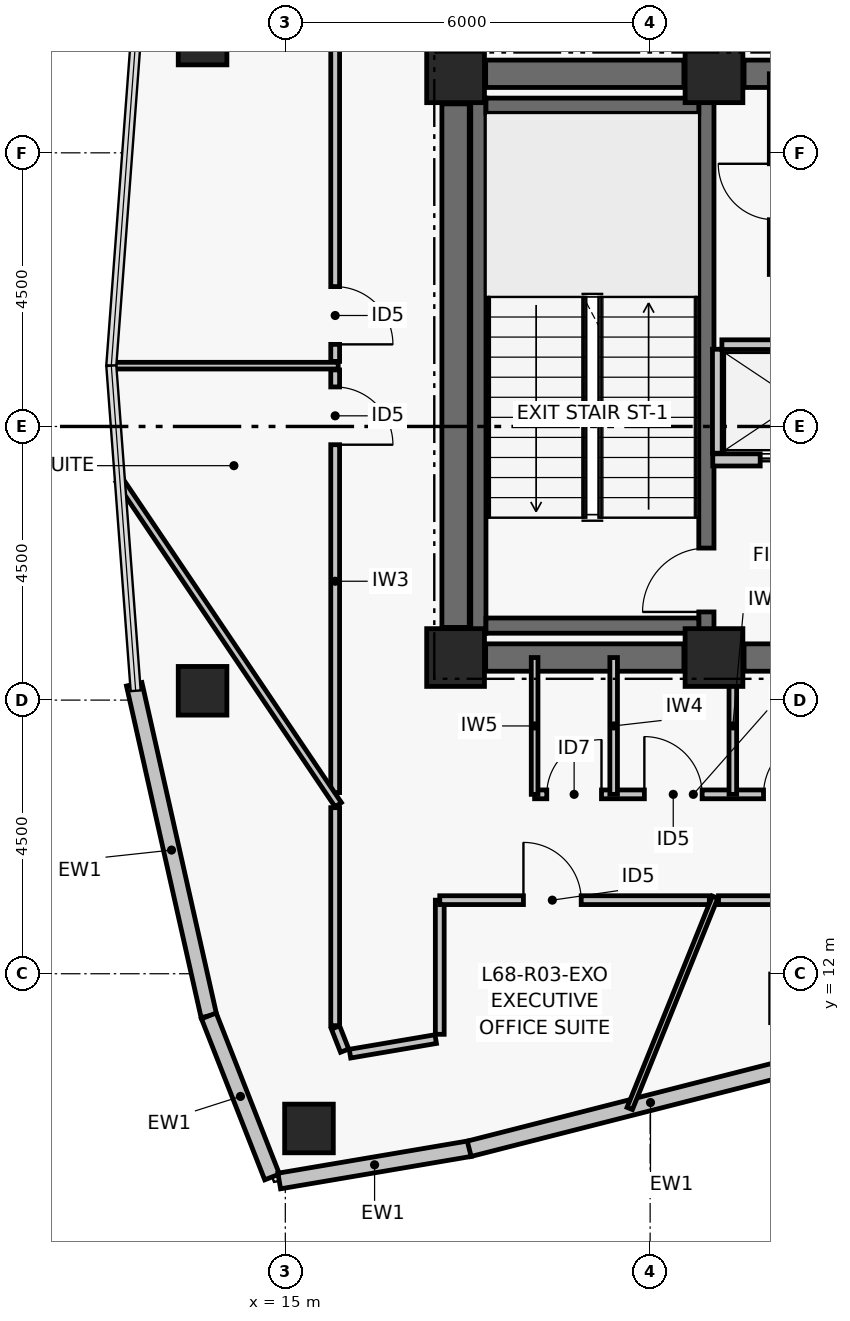
"""IFC4 building model, lengths in metres.
Left out: names, types, materials, properties, quantities, classifications, styles, units other than length and angle.
Written with IfcOpenShell. Run it as: python <this file> out.ifc"""

import sys

from ifc_helpers import new_model, si_unit, direction, frame, frame_2d, origin, origin_2d, place, context, subcontext, project, spatial, rectangle, hollow_rectangle, extrude, element, fill, save


model = new_model("IFC4")
c1 = context("Model", 3, precision=1e-05, world=origin(), true_north=direction((0.0, 1.0)))
c2 = subcontext(c1, "Body", "Model", "MODEL_VIEW")
j1 = project(units=[si_unit("LENGTHUNIT", "METRE"), si_unit("PLANEANGLEUNIT", "RADIAN")], contexts=[c1])
p1 = place(None, origin())
s1 = spatial("IfcSite", under=j1, at=p1, CompositionType="ELEMENT")
p2 = place(p1, origin())
s2 = spatial("IfcBuilding", under=s1, at=p2, CompositionType="ELEMENT")
p3 = place(p2, frame((0.0, 0.0, 269.46)))
s3 = spatial("IfcBuildingStorey", under=s2, at=p3, CompositionType="ELEMENT", Elevation=269.46)
for number, where, z_axis, x_axis in (
    (1, (17.8, 17.2, 0.0), (0.0, 0.0, 1.0), (1.0, 0.0, 0.0)),
    (2, (22.05, 17.2, 0.0), (0.0, 0.0, 1.0), (1.0, 0.0, 0.0)),
    (3, (17.8, 26.8, 0.0), (0.0, 0.0, 1.0), (1.0, 0.0, 0.0)),
    (4, (22.05, 26.8, 0.0), (0.0, 0.0, 1.0), (1.0, 0.0, 0.0)),
):
    element("IfcColumn", number, at=place(p3, frame(where, z_axis=z_axis, x_axis=x_axis)), inside=s3, PredefinedType="COLUMN", context=c2, shape_type="SweptSolid", body=[
        extrude(rectangle(XDim=0.95, YDim=0.95, at=origin_2d()), origin(), (0.0, 0.0, 1.0), 3.72),
    ])
p4 = place(p3, frame((18.295, 17.2, 0.0), z_axis=(0.0, 0.0, 1.0), x_axis=(1.0, 0.0, 0.0)))
e5 = element("IfcWall", 5, at=p4, inside=s3, PredefinedType="SHEAR", context=c2, shape_type="SweptSolid", body=[
    extrude(rectangle(XDim=3.26, YDim=0.45, at=frame_2d((1.63, 0.0))), origin(), (0.0, 0.0, 1.0), 3.5),
])
p5 = place(p3, frame((22.545, 17.2, 0.0), z_axis=(0.0, 0.0, 1.0), x_axis=(1.0, 0.0, 0.0)))
e6 = element("IfcWall", 6, at=p5, inside=s3, PredefinedType="SHEAR", context=c2, shape_type="SweptSolid", body=[
    extrude(rectangle(XDim=1.805, YDim=0.45, at=frame_2d((0.903, 0.0))), origin(), (0.0, 0.0, 1.0), 3.5),
])
p6 = place(p3, frame((18.295, 26.8, 0.0), z_axis=(0.0, 0.0, 1.0), x_axis=(1.0, 0.0, 0.0)))
e7 = element("IfcWall", 7, at=p6, inside=s3, PredefinedType="SHEAR", context=c2, shape_type="SweptSolid", body=[
    extrude(rectangle(XDim=3.26, YDim=0.45, at=frame_2d((1.63, 0.0))), origin(), (0.0, 0.0, 1.0), 3.5),
])
p7 = place(p3, frame((22.545, 26.8, 0.0), z_axis=(0.0, 0.0, 1.0), x_axis=(1.0, 0.0, 0.0)))
e8 = element("IfcWall", 8, at=p7, inside=s3, PredefinedType="SHEAR", context=c2, shape_type="SweptSolid", body=[
    extrude(rectangle(XDim=1.805, YDim=0.45, at=frame_2d((0.903, 0.0))), origin(), (0.0, 0.0, 1.0), 3.5),
])
p8 = place(p3, frame((17.8, 17.695, 0.0), z_axis=(0.0, 0.0, 1.0), x_axis=(0.0, 1.0, 0.0)))
e9 = element("IfcWall", 9, at=p8, inside=s3, PredefinedType="SHEAR", context=c2, shape_type="SweptSolid", body=[
    extrude(rectangle(XDim=8.61, YDim=0.45, at=frame_2d((4.305, 0.0))), origin(), (0.0, 0.0, 1.0), 3.5),
])
p9 = place(p3, frame((18.175, 17.6, 0.0), z_axis=(0.0, 0.0, 1.0), x_axis=(0.0, 1.0, 0.0)))
e10 = element("IfcWall", 10, at=p9, inside=s3, PredefinedType="SHEAR", context=c2, shape_type="SweptSolid", body=[
    extrude(rectangle(XDim=8.8, YDim=0.25, at=frame_2d((4.4, 0.0))), origin(), (0.0, 0.0, 1.0), 3.5),
])
p10 = place(p3, frame((21.925, 17.6, 0.0), z_axis=(0.0, 0.0, 1.0), x_axis=(0.0, 1.0, 0.0)))
e11 = element("IfcWall", 11, at=p10, inside=s3, PredefinedType="SHEAR", context=c2, shape_type="SweptSolid", body=[
    extrude(rectangle(XDim=8.8, YDim=0.25, at=frame_2d((4.4, 0.0))), origin(), (0.0, 0.0, 1.0), 3.5),
])
p11 = place(p10, frame((0.35, 0.0, 0.0)))
e12 = element("IfcOpeningElement", 12, at=p11, cuts=e11, PredefinedType="OPENING", context=c2, shape_type="SweptSolid", body=[
    extrude(rectangle(XDim=1.05, YDim=2.08, at=frame_2d((0.525, 1.04))), frame((0.0, 0.135, 0.0), z_axis=(0.0, -1.0, 0.0), x_axis=(1.0, 0.0, 0.0)), (0.0, 0.0, 1.0), 0.27),
])
for number, where, z_axis, x_axis in (
    (13, (18.3, 17.725, 0.0), (0.0, 0.0, 1.0), (1.0, 0.0, 0.0)),
    (14, (18.3, 26.275, 0.0), (0.0, 0.0, 1.0), (1.0, 0.0, 0.0)),
):
    element("IfcWall", number, at=place(p3, frame(where, z_axis=z_axis, x_axis=x_axis)), inside=s3, PredefinedType="SHEAR", context=c2, shape_type="SweptSolid", body=[
        extrude(rectangle(XDim=3.5, YDim=0.25, at=frame_2d((1.75, 0.0))), origin(), (0.0, 0.0, 1.0), 3.5),
    ])
for number, where, z_axis, x_axis in (
    (15, (13.639, 27.347, 0.0), (0.0, 0.0, 1.0), (1.0, 0.0, 0.0)),
    (16, (13.639, 16.653, 0.0), (0.0, 0.0, 1.0), (1.0, 0.0, 0.0)),
    (17, (15.389, 9.455, 0.0), (0.0, 0.0, 1.0), (1.0, 0.0, 0.0)),
):
    element("IfcColumn", number, at=place(p3, frame(where, z_axis=z_axis, x_axis=x_axis)), inside=s3, PredefinedType="COLUMN", context=c2, shape_type="SweptSolid", body=[
        extrude(hollow_rectangle(XDim=0.8, YDim=0.8, WallThickness=0.035, at=origin_2d()), origin(), (0.0, 0.0, 1.0), 3.72),
    ])
p12 = place(p3, frame((13.742, 11.307, 0.0), z_axis=(0.0, 0.0, 1.0), x_axis=(-0.219500763731, 0.97561232809, 0.0)))
e18 = element("IfcWall", 18, at=p12, inside=s3, PredefinedType="PARTITIONING", context=c2, shape_type="SweptSolid", body=[
    extrude(rectangle(XDim=5.59, YDim=0.26, at=frame_2d((2.795, 0.0))), origin(), (0.0, 0.0, 1.0), 3.5),
])
p13 = place(p3, frame((14.782, 8.658, 0.0), z_axis=(0.0, 0.0, 1.0), x_axis=(-0.36559927932, 0.930772349697, 0.0)))
e19 = element("IfcWall", 19, at=p13, inside=s3, PredefinedType="PARTITIONING", context=c2, shape_type="SweptSolid", body=[
    extrude(rectangle(XDim=2.845, YDim=0.26, at=frame_2d((1.423, 0.0))), origin(), (0.0, 0.0, 1.0), 3.5),
])
p14 = place(p3, frame((18.036, 9.124, 0.0), z_axis=(0.0, 0.0, 1.0), x_axis=(-0.985889432766, -0.167397808709, 0.0)))
e20 = element("IfcWall", 20, at=p14, inside=s3, PredefinedType="PARTITIONING", context=c2, shape_type="SweptSolid", body=[
    extrude(rectangle(XDim=3.181, YDim=0.26, at=frame_2d((1.59, 0.0))), origin(), (0.0, 0.0, 1.0), 3.5),
])
p15 = place(p3, frame((23.988, 10.642, 0.0), z_axis=(0.0, 0.0, 1.0), x_axis=(-0.968988278672, -0.247106689096, 0.0)))
e21 = element("IfcWall", 21, at=p15, inside=s3, PredefinedType="PARTITIONING", context=c2, shape_type="SweptSolid", body=[
    extrude(rectangle(XDim=6.154, YDim=0.26, at=frame_2d((3.077, 0.0))), origin(), (0.0, 0.0, 1.0), 3.5),
])
p16 = place(p3, frame((22.03, 20.45, 0.0), z_axis=(0.0, 0.0, 1.0), x_axis=(1.0, 0.0, 0.0)))
e22 = element("IfcWall", 22, at=p16, inside=s3, PredefinedType="PARTITIONING", context=c2, shape_type="SweptSolid", body=[
    extrude(rectangle(XDim=2.8, YDim=0.2, at=frame_2d((1.4, 0.0))), origin(), (0.0, 0.0, 1.0), 3.5),
])
p17 = place(p16, frame((0.78, 0.0, 0.0)))
e23 = element("IfcOpeningElement", 23, at=p17, cuts=e22, PredefinedType="OPENING", context=c2, shape_type="SweptSolid", body=[
    extrude(rectangle(XDim=1.1, YDim=2.08, at=frame_2d((0.55, 1.04))), frame((0.0, 0.11, 0.0), z_axis=(0.0, -1.0, 0.0), x_axis=(1.0, 0.0, 0.0)), (0.0, 0.0, 1.0), 0.22),
])
p18 = place(p3, frame((22.105, 20.56, 0.0), z_axis=(0.0, 0.0, 1.0), x_axis=(0.0, 1.0, 0.0)))
e24 = element("IfcWall", 24, at=p18, inside=s3, PredefinedType="PARTITIONING", context=c2, shape_type="SweptSolid", body=[
    extrude(rectangle(XDim=1.71, YDim=0.16, at=frame_2d((0.855, 0.0))), origin(), (0.0, 0.0, 1.0), 3.5),
])
p19 = place(p3, frame((22.18, 22.345, 0.0), z_axis=(0.0, 0.0, 1.0), x_axis=(1.0, 0.0, 0.0)))
e25 = element("IfcWall", 25, at=p19, inside=s3, PredefinedType="PARTITIONING", context=c2, shape_type="SweptSolid", body=[
    extrude(rectangle(XDim=2.65, YDim=0.16, at=frame_2d((1.325, 0.0))), origin(), (0.0, 0.0, 1.0), 3.5),
])
p20 = place(p3, frame((23.04, 23.5, 0.0), z_axis=(0.0, 0.0, 1.0), x_axis=(0.0, 1.0, 0.0)))
e26 = element("IfcWall", 26, at=p20, inside=s3, PredefinedType="PARTITIONING", context=c2, shape_type="SweptSolid", body=[
    extrude(rectangle(XDim=3.3, YDim=0.16, at=frame_2d((1.65, 0.0))), origin(), (0.0, 0.0, 1.0), 2.63),
])
p21 = place(p20, frame((0.9, 0.0, 0.0)))
e27 = element("IfcOpeningElement", 27, at=p21, cuts=e26, PredefinedType="OPENING", context=c2, shape_type="SweptSolid", body=[
    extrude(rectangle(XDim=0.92, YDim=2.05, at=frame_2d((0.46, 1.025))), frame((0.0, 0.09, 0.0), z_axis=(0.0, -1.0, 0.0), x_axis=(1.0, 0.0, 0.0)), (0.0, 0.0, 1.0), 0.18),
])
p22 = place(p3, frame((19.1, 14.95, 0.0), z_axis=(0.0, 0.0, 1.0), x_axis=(1.0, 0.0, 0.0)))
e28 = element("IfcWall", 28, at=p22, inside=s3, PredefinedType="PARTITIONING", context=c2, shape_type="SweptSolid", body=[
    extrude(rectangle(XDim=5.22, YDim=0.145, at=frame_2d((2.61, 0.0))), origin(), (0.0, 0.0, 1.0), 2.78),
])
p23 = place(p22, frame((0.2, 0.0, 0.0)))
e29 = element("IfcOpeningElement", 29, at=p23, cuts=e28, PredefinedType="OPENING", context=c2, shape_type="SweptSolid", body=[
    extrude(rectangle(XDim=0.9, YDim=2.02, at=frame_2d((0.45, 1.01))), frame((0.0, 0.083, 0.0), z_axis=(0.0, -1.0, 0.0), x_axis=(1.0, 0.0, 0.0)), (0.0, 0.0, 1.0), 0.165),
])
p24 = place(p22, frame((1.805, 0.0, 0.0)))
e30 = element("IfcOpeningElement", 30, at=p24, cuts=e28, PredefinedType="OPENING", context=c2, shape_type="SweptSolid", body=[
    extrude(rectangle(XDim=0.95, YDim=2.06, at=frame_2d((0.475, 1.03))), frame((0.0, 0.083, 0.0), z_axis=(0.0, -1.0, 0.0), x_axis=(1.0, 0.0, 0.0)), (0.0, 0.0, 1.0), 0.165),
])
p25 = place(p22, frame((3.765, 0.0, 0.0)))
e31 = element("IfcOpeningElement", 31, at=p25, cuts=e28, PredefinedType="OPENING", context=c2, shape_type="SweptSolid", body=[
    extrude(rectangle(XDim=0.95, YDim=2.06, at=frame_2d((0.475, 1.03))), frame((0.0, 0.083, 0.0), z_axis=(0.0, -1.0, 0.0), x_axis=(1.0, 0.0, 0.0)), (0.0, 0.0, 1.0), 0.165),
])
p26 = place(p3, frame((19.1, 14.95, 0.0), z_axis=(0.0, 0.0, 1.0), x_axis=(0.0, 1.0, 0.0)))
e32 = element("IfcWall", 32, at=p26, inside=s3, PredefinedType="PARTITIONING", context=c2, shape_type="SweptSolid", body=[
    extrude(rectangle(XDim=2.25, YDim=0.11, at=frame_2d((1.125, 0.0))), origin(), (0.0, 0.0, 1.0), 2.63),
])
for number, where, z_axis, x_axis in (
    (33, (20.4, 14.95, 0.0), (0.0, 0.0, 1.0), (0.0, 1.0, 0.0)),
    (34, (22.36, 14.95, 0.0), (0.0, 0.0, 1.0), (0.0, 1.0, 0.0)),
):
    element("IfcWall", number, at=place(p3, frame(where, z_axis=z_axis, x_axis=x_axis)), inside=s3, PredefinedType="PARTITIONING", context=c2, shape_type="SweptSolid", body=[
        extrude(rectangle(XDim=2.25, YDim=0.125, at=frame_2d((1.125, 0.0))), origin(), (0.0, 0.0, 1.0), 2.63),
    ])
p27 = place(p3, frame((15.82, 21.93, 0.0), z_axis=(0.0, 0.0, 1.0), x_axis=(0.0, -1.0, 0.0)))
e35 = element("IfcWall", 35, at=p27, inside=s3, PredefinedType="PARTITIONING", context=c2, shape_type="SweptSolid", body=[
    extrude(rectangle(XDim=6.951, YDim=0.145, at=frame_2d((3.475, 0.0))), origin(), (0.0, 0.0, 1.0), 2.78),
])
p28 = place(p27, frame((0.28, 0.0, 0.0)))
e36 = element("IfcOpeningElement", 36, at=p28, cuts=e35, PredefinedType="OPENING", context=c2, shape_type="SweptSolid", body=[
    extrude(rectangle(XDim=0.95, YDim=2.06, at=frame_2d((0.475, 1.03))), frame((0.0, 0.083, 0.0), z_axis=(0.0, -1.0, 0.0), x_axis=(1.0, 0.0, 0.0)), (0.0, 0.0, 1.0), 0.165),
])
p29 = place(p3, frame((15.82, 14.731, 0.0), z_axis=(0.0, 0.0, 1.0), x_axis=(0.0, -1.0, 0.0)))
e37 = element("IfcWall", 37, at=p29, inside=s3, PredefinedType="PARTITIONING", context=c2, shape_type="SweptSolid", body=[
    extrude(rectangle(XDim=3.585, YDim=0.145, at=frame_2d((1.792, 0.0))), origin(), (0.0, 0.0, 1.0), 2.78),
])
p30 = place(p3, frame((15.825, 11.117, 0.0), z_axis=(0.0, 0.0, 1.0), x_axis=(0.365633948196, -0.930758731319, 0.0)))
e38 = element("IfcWall", 38, at=p30, inside=s3, PredefinedType="PARTITIONING", context=c2, shape_type="SweptSolid", body=[
    extrude(rectangle(XDim=0.41, YDim=0.145, at=frame_2d((0.205, 0.0))), origin(), (0.0, 0.0, 1.0), 2.78),
])
p31 = place(p3, frame((16.063, 10.686, 0.0), z_axis=(0.0, 0.0, 1.0), x_axis=(0.985881780308, 0.167442871621, 0.0)))
e39 = element("IfcWall", 39, at=p31, inside=s3, PredefinedType="PARTITIONING", context=c2, shape_type="SweptSolid", body=[
    extrude(rectangle(XDim=1.43, YDim=0.145, at=frame_2d((0.715, 0.0))), origin(), (0.0, 0.0, 1.0), 3.13),
])
p32 = place(p3, frame((17.54, 11.004, 0.0), z_axis=(0.0, 0.0, 1.0), x_axis=(0.0, 1.0, 0.0)))
e40 = element("IfcWall", 40, at=p32, inside=s3, PredefinedType="PARTITIONING", context=c2, shape_type="SweptSolid", body=[
    extrude(rectangle(XDim=2.206, YDim=0.145, at=frame_2d((1.103, 0.0))), origin(), (0.0, 0.0, 1.0), 3.13),
])
p33 = place(p3, frame((17.54, 13.21, 0.0), z_axis=(0.0, 0.0, 1.0), x_axis=(1.0, 0.0, 0.0)))
e41 = element("IfcWall", 41, at=p33, inside=s3, PredefinedType="PARTITIONING", context=c2, shape_type="SweptSolid", body=[
    extrude(rectangle(XDim=4.433, YDim=0.145, at=frame_2d((2.217, 0.0))), origin(), (0.0, 0.0, 1.0), 3.13),
])
p34 = place(p33, frame((1.376, 0.0, 0.0)))
e42 = element("IfcOpeningElement", 42, at=p34, cuts=e41, PredefinedType="OPENING", context=c2, shape_type="SweptSolid", body=[
    extrude(rectangle(XDim=0.95, YDim=2.06, at=frame_2d((0.475, 1.03))), frame((0.0, 0.083, 0.0), z_axis=(0.0, -1.0, 0.0), x_axis=(1.0, 0.0, 0.0)), (0.0, 0.0, 1.0), 0.165),
])
p35 = place(p3, frame((22.124, 13.21, 0.0), z_axis=(0.0, 0.0, 1.0), x_axis=(1.0, 0.0, 0.0)))
e43 = element("IfcWall", 43, at=p35, inside=s3, PredefinedType="PARTITIONING", context=c2, shape_type="SweptSolid", body=[
    extrude(rectangle(XDim=6.986, YDim=0.145, at=frame_2d((3.493, 0.0))), origin(), (0.0, 0.0, 1.0), 2.78),
])
p36 = place(p35, frame((5.098, 0.0, 0.0)))
e44 = element("IfcOpeningElement", 44, at=p36, cuts=e43, PredefinedType="OPENING", context=c2, shape_type="SweptSolid", body=[
    extrude(rectangle(XDim=0.92, YDim=2.05, at=frame_2d((0.46, 1.025))), frame((0.0, 0.083, 0.0), z_axis=(0.0, -1.0, 0.0), x_axis=(1.0, 0.0, 0.0)), (0.0, 0.0, 1.0), 0.165),
])
p37 = place(p3, frame((15.82, 32.854, 0.0), z_axis=(0.0, 0.0, 1.0), x_axis=(0.0, -1.0, 0.0)))
e45 = element("IfcWall", 45, at=p37, inside=s3, PredefinedType="PARTITIONING", context=c2, shape_type="SweptSolid", body=[
    extrude(rectangle(XDim=10.784, YDim=0.145, at=frame_2d((5.392, 0.0))), origin(), (0.0, 0.0, 1.0), 2.78),
])
p38 = place(p37, frame((9.554, 0.0, 0.0)))
e46 = element("IfcOpeningElement", 46, at=p38, cuts=e45, PredefinedType="OPENING", context=c2, shape_type="SweptSolid", body=[
    extrude(rectangle(XDim=0.95, YDim=2.06, at=frame_2d((0.475, 1.03))), frame((0.0, 0.083, 0.0), z_axis=(0.0, -1.0, 0.0), x_axis=(1.0, 0.0, 0.0)), (0.0, 0.0, 1.0), 0.165),
])
p39 = place(p3, frame((15.87, 22.0, 0.0), z_axis=(0.0, 0.0, 1.0), x_axis=(-1.0, 0.0, 0.0)))
e47 = element("IfcWall", 47, at=p39, inside=s3, PredefinedType="PARTITIONING", context=c2, shape_type="SweptSolid", body=[
    extrude(rectangle(XDim=3.742, YDim=0.11, at=frame_2d((1.871, 0.0))), origin(), (0.0, 0.0, 1.0), 2.98),
])
p40 = place(p3, frame((22.069, 13.26, 0.0), z_axis=(0.0, 0.0, 1.0), x_axis=(-0.374599797966, -0.927186600078, 0.0)))
e48 = element("IfcWall", 48, at=p40, inside=s3, PredefinedType="PARTITIONING", context=c2, shape_type="SweptSolid", body=[
    extrude(rectangle(XDim=3.749, YDim=0.095, at=frame_2d((1.875, 0.0))), origin(), (0.0, 0.0, 1.0), 2.98),
])
p41 = place(p3, frame((12.269, 20.118, 0.0), z_axis=(0.0, 0.0, 1.0), x_axis=(0.559206512114, -0.829028393247, 0.0)))
e49 = element("IfcWall", 49, at=p41, inside=s3, PredefinedType="PARTITIONING", context=c2, shape_type="SweptSolid", body=[
    extrude(rectangle(XDim=6.44, YDim=0.125, at=frame_2d((3.22, 0.0))), origin(), (0.0, 0.0, 1.0), 2.78),
])
p42 = place(p11, origin())
e50 = element("IfcDoor", 50, at=p42, inside=s3, OperationType="SINGLE_SWING_LEFT", PredefinedType="DOOR", context=c2, shape_type="SweptSolid", body=[
    extrude(rectangle(XDim=1.05, YDim=2.08, at=frame_2d((0.525, 1.04))), frame((0.0, 0.025, 0.0), z_axis=(0.0, -1.0, 0.0), x_axis=(1.0, 0.0, 0.0)), (0.0, 0.0, 1.0), 0.05),
])
fill(e12, e50)
p43 = place(p17, origin())
e51 = element("IfcDoor", 51, at=p43, inside=s3, OperationType="DOUBLE_DOOR_SLIDING", PredefinedType="DOOR", context=c2, shape_type="SweptSolid", body=[
    extrude(rectangle(XDim=1.1, YDim=2.08, at=frame_2d((0.55, 1.04))), frame((0.0, 0.025, 0.0), z_axis=(0.0, -1.0, 0.0), x_axis=(1.0, 0.0, 0.0)), (0.0, 0.0, 1.0), 0.05),
])
fill(e23, e51)
p44 = place(p23, origin())
e52 = element("IfcDoor", 52, at=p44, inside=s3, OperationType="SINGLE_SWING_RIGHT", PredefinedType="DOOR", context=c2, shape_type="SweptSolid", body=[
    extrude(rectangle(XDim=0.9, YDim=2.02, at=frame_2d((0.45, 1.01))), frame((0.0, 0.025, 0.0), z_axis=(0.0, -1.0, 0.0), x_axis=(1.0, 0.0, 0.0)), (0.0, 0.0, 1.0), 0.05),
])
fill(e29, e52)
p45 = place(p24, origin())
e53 = element("IfcDoor", 53, at=p45, inside=s3, OperationType="SINGLE_SWING_LEFT", PredefinedType="DOOR", context=c2, shape_type="SweptSolid", body=[
    extrude(rectangle(XDim=0.95, YDim=2.06, at=frame_2d((0.475, 1.03))), frame((0.0, 0.025, 0.0), z_axis=(0.0, -1.0, 0.0), x_axis=(1.0, 0.0, 0.0)), (0.0, 0.0, 1.0), 0.05),
])
fill(e30, e53)
p46 = place(p25, origin())
e54 = element("IfcDoor", 54, at=p46, inside=s3, OperationType="SINGLE_SWING_RIGHT", PredefinedType="DOOR", context=c2, shape_type="SweptSolid", body=[
    extrude(rectangle(XDim=0.95, YDim=2.06, at=frame_2d((0.475, 1.03))), frame((0.0, 0.025, 0.0), z_axis=(0.0, -1.0, 0.0), x_axis=(1.0, 0.0, 0.0)), (0.0, 0.0, 1.0), 0.05),
])
fill(e31, e54)
p47 = place(p28, origin())
e55 = element("IfcDoor", 55, at=p47, inside=s3, OperationType="SINGLE_SWING_RIGHT", PredefinedType="DOOR", context=c2, shape_type="SweptSolid", body=[
    extrude(rectangle(XDim=0.95, YDim=2.06, at=frame_2d((0.475, 1.03))), frame((0.0, 0.025, 0.0), z_axis=(0.0, -1.0, 0.0), x_axis=(1.0, 0.0, 0.0)), (0.0, 0.0, 1.0), 0.05),
])
fill(e36, e55)
p48 = place(p34, origin())
e56 = element("IfcDoor", 56, at=p48, inside=s3, OperationType="SINGLE_SWING_LEFT", PredefinedType="DOOR", context=c2, shape_type="SweptSolid", body=[
    extrude(rectangle(XDim=0.95, YDim=2.06, at=frame_2d((0.475, 1.03))), frame((0.0, 0.025, 0.0), z_axis=(0.0, -1.0, 0.0), x_axis=(1.0, 0.0, 0.0)), (0.0, 0.0, 1.0), 0.05),
])
fill(e42, e56)
p49 = place(p38, origin())
e57 = element("IfcDoor", 57, at=p49, inside=s3, OperationType="SINGLE_SWING_RIGHT", PredefinedType="DOOR", context=c2, shape_type="SweptSolid", body=[
    extrude(rectangle(XDim=0.95, YDim=2.06, at=frame_2d((0.475, 1.03))), frame((0.0, 0.025, 0.0), z_axis=(0.0, -1.0, 0.0), x_axis=(1.0, 0.0, 0.0)), (0.0, 0.0, 1.0), 0.05),
])
fill(e46, e57)
save(model, sys.argv[1])
